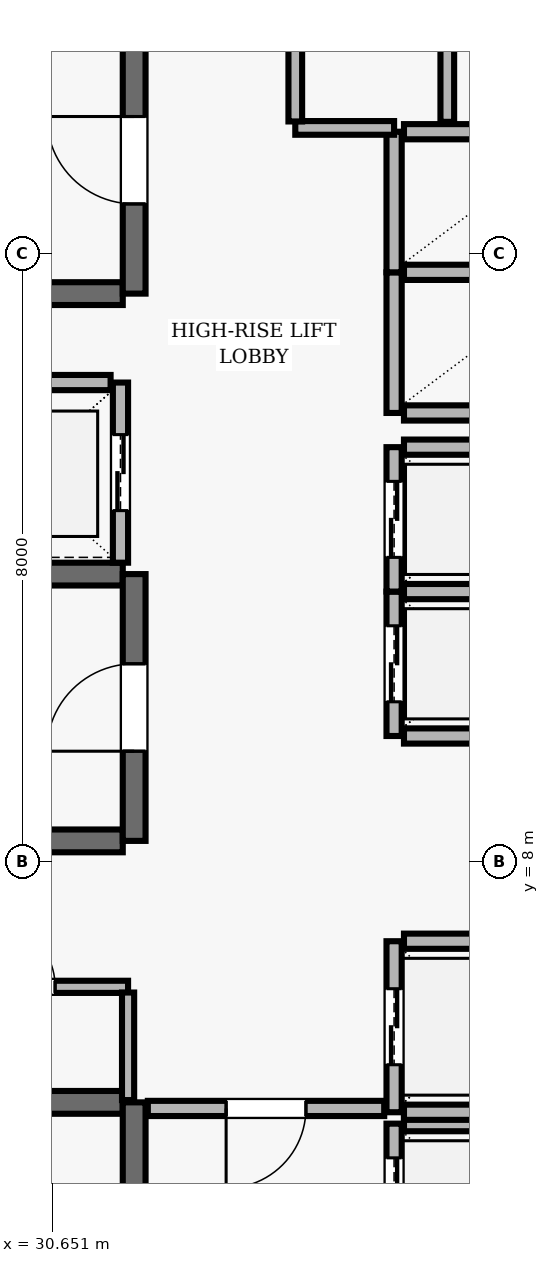
"""IFC4 building model, lengths in metres.
Left out: names, types, materials, properties, quantities, classifications, styles, units other than length and angle.
Written with IfcOpenShell. Run it as: python <this file> out.ifc"""

import sys

from ifc_helpers import new_model, si_unit, direction, frame, frame_2d, origin, place, context, subcontext, project, spatial, rectangle, extrude, element, fill, save


model = new_model("IFC4")
c1 = context("Model", 3, precision=1e-05, world=origin(), true_north=direction((0.0, 1.0)))
c2 = subcontext(c1, "Body", "Model", "MODEL_VIEW")
j1 = project(units=[si_unit("LENGTHUNIT", "METRE"), si_unit("PLANEANGLEUNIT", "RADIAN")], contexts=[c1])
p1 = place(None, origin())
s1 = spatial("IfcSite", under=j1, at=p1, CompositionType="ELEMENT")
p2 = place(p1, origin())
s2 = spatial("IfcBuilding", under=s1, at=p2, CompositionType="ELEMENT")
p3 = place(p2, frame((0.0, 0.0, 207.0)))
s3 = spatial("IfcBuildingStorey", under=s2, at=p3, CompositionType="ELEMENT", Elevation=207.0)
p4 = place(p3, frame((31.58, 4.83, 0.0), z_axis=(0.0, 0.0, 1.0), x_axis=(-1.0, 0.0, 0.0)))
e1 = element("IfcWall", 1, at=p4, inside=s3, PredefinedType="SHEAR", context=c2, shape_type="SweptSolid", body=[
    extrude(rectangle(XDim=8.36, YDim=0.3, at=frame_2d((4.18, 0.0))), origin(), (0.0, 0.0, 1.0), 3.69),
])
p5 = place(p3, frame((31.73, 0.96, 0.0), z_axis=(0.0, 0.0, 1.0), x_axis=(0.0, 1.0, 0.0)))
e2 = element("IfcWall", 2, at=p5, inside=s3, PredefinedType="SHEAR", context=c2, shape_type="SweptSolid", body=[
    extrude(rectangle(XDim=3.87, YDim=0.3, at=frame_2d((1.935, 0.0))), origin(), (0.0, 0.0, 1.0), 3.69),
])
p6 = place(p5, frame((1.54, 0.0, 0.0)))
e3 = element("IfcOpeningElement", 3, at=p6, cuts=e2, PredefinedType="OPENING", context=c2, shape_type="SweptSolid", body=[
    extrude(rectangle(XDim=1.15, YDim=2.15, at=frame_2d((0.575, 1.075))), frame((0.0, 0.16, 0.0), z_axis=(0.0, -1.0, 0.0), x_axis=(1.0, 0.0, 0.0)), (0.0, 0.0, 1.0), 0.32),
])
p7 = place(p3, frame((23.22, 15.47, 0.0), z_axis=(0.0, 0.0, 1.0), x_axis=(1.0, 0.0, 0.0)))
e4 = element("IfcWall", 4, at=p7, inside=s3, PredefinedType="SHEAR", context=c2, shape_type="SweptSolid", body=[
    extrude(rectangle(XDim=8.36, YDim=0.3, at=frame_2d((4.18, 0.0))), origin(), (0.0, 0.0, 1.0), 3.69),
])
p8 = place(p3, frame((31.73, 15.47, 0.0), z_axis=(0.0, 0.0, 1.0), x_axis=(0.0, 1.0, 0.0)))
e5 = element("IfcWall", 5, at=p8, inside=s3, PredefinedType="SHEAR", context=c2, shape_type="SweptSolid", body=[
    extrude(rectangle(XDim=3.51, YDim=0.3, at=frame_2d((1.755, 0.0))), origin(), (0.0, 0.0, 1.0), 3.69),
])
p9 = place(p8, frame((1.18, 0.0, 0.0)))
e6 = element("IfcOpeningElement", 6, at=p9, cuts=e5, PredefinedType="OPENING", context=c2, shape_type="SweptSolid", body=[
    extrude(rectangle(XDim=1.15, YDim=2.15, at=frame_2d((0.575, 1.075))), frame((0.0, 0.16, 0.0), z_axis=(0.0, -1.0, 0.0), x_axis=(1.0, 0.0, 0.0)), (0.0, 0.0, 1.0), 0.32),
])
for number, where, z_axis, x_axis in (
    (7, (31.58, 11.78, 0.0), (0.0, 0.0, 1.0), (-1.0, 0.0, 0.0)),
    (8, (23.22, 8.27, 0.0), (0.0, 0.0, 1.0), (1.0, 0.0, 0.0)),
):
    element("IfcWall", number, at=place(p3, frame(where, z_axis=z_axis, x_axis=x_axis)), inside=s3, PredefinedType="SHEAR", context=c2, shape_type="SweptSolid", body=[
        extrude(rectangle(XDim=8.36, YDim=0.3, at=frame_2d((4.18, 0.0))), origin(), (0.0, 0.0, 1.0), 3.69),
    ])
p10 = place(p3, frame((31.73, 8.27, 0.0), z_axis=(0.0, 0.0, 1.0), x_axis=(0.0, 1.0, 0.0)))
e9 = element("IfcWall", 9, at=p10, inside=s3, PredefinedType="SHEAR", context=c2, shape_type="SweptSolid", body=[
    extrude(rectangle(XDim=3.51, YDim=0.3, at=frame_2d((1.755, 0.0))), origin(), (0.0, 0.0, 1.0), 3.69),
])
p11 = place(p10, frame((1.18, 0.0, 0.0)))
e10 = element("IfcOpeningElement", 10, at=p11, cuts=e9, PredefinedType="OPENING", context=c2, shape_type="SweptSolid", body=[
    extrude(rectangle(XDim=1.15, YDim=2.15, at=frame_2d((0.575, 1.075))), frame((0.0, 0.16, 0.0), z_axis=(0.0, -1.0, 0.0), x_axis=(1.0, 0.0, 0.0)), (0.0, 0.0, 1.0), 0.32),
])
p12 = place(p3, frame((35.15, 4.55, 0.0), z_axis=(0.0, 0.0, 1.0), x_axis=(0.0, -1.0, 0.0)))
e11 = element("IfcWall", 11, at=p12, inside=s3, PredefinedType="SOLIDWALL", context=c2, shape_type="SweptSolid", body=[
    extrude(rectangle(XDim=2.1, YDim=0.2, at=frame_2d((1.05, 0.0))), origin(), (0.0, 0.0, 1.0), 3.69),
])
p13 = place(p12, frame((0.45, 0.0, 0.0)))
e12 = element("IfcOpeningElement", 12, at=p13, cuts=e11, PredefinedType="OPENING", context=c2, shape_type="SweptSolid", body=[
    extrude(rectangle(XDim=1.2, YDim=2.15, at=frame_2d((0.6, 1.075))), frame((0.0, 0.11, 0.0), z_axis=(0.0, -1.0, 0.0), x_axis=(1.0, 0.0, 0.0)), (0.0, 0.0, 1.0), 0.22),
])
p14 = place(p3, frame((37.42, 4.55, 0.0), z_axis=(0.0, 0.0, 1.0), x_axis=(-1.0, 0.0, 0.0)))
e13 = element("IfcWall", 13, at=p14, inside=s3, PredefinedType="SOLIDWALL", context=c2, shape_type="SweptSolid", body=[
    extrude(rectangle(XDim=2.14, YDim=0.2, at=frame_2d((1.07, 0.0))), origin(), (0.0, 0.0, 1.0), 3.69),
])
p15 = place(p3, frame((35.15, 6.95, 0.0), z_axis=(0.0, 0.0, 1.0), x_axis=(0.0, -1.0, 0.0)))
e14 = element("IfcWall", 14, at=p15, inside=s3, PredefinedType="SOLIDWALL", context=c2, shape_type="SweptSolid", body=[
    extrude(rectangle(XDim=2.25, YDim=0.2, at=frame_2d((1.125, 0.0))), origin(), (0.0, 0.0, 1.0), 3.69),
])
p16 = place(p15, frame((0.625, 0.0, 0.0)))
e15 = element("IfcOpeningElement", 15, at=p16, cuts=e14, PredefinedType="OPENING", context=c2, shape_type="SweptSolid", body=[
    extrude(rectangle(XDim=1.0, YDim=2.1, at=frame_2d((0.5, 1.05))), frame((0.0, 0.11, 0.0), z_axis=(0.0, -1.0, 0.0), x_axis=(1.0, 0.0, 0.0)), (0.0, 0.0, 1.0), 0.22),
])
for number, where, z_axis, x_axis in (
    (16, (35.28, 4.7, 0.0), (0.0, 0.0, 1.0), (1.0, 0.0, 0.0)),
    (17, (37.42, 6.95, 0.0), (0.0, 0.0, 1.0), (-1.0, 0.0, 0.0)),
):
    element("IfcWall", number, at=place(p3, frame(where, z_axis=z_axis, x_axis=x_axis)), inside=s3, PredefinedType="SOLIDWALL", context=c2, shape_type="SweptSolid", body=[
        extrude(rectangle(XDim=2.14, YDim=0.2, at=frame_2d((1.07, 0.0))), origin(), (0.0, 0.0, 1.0), 3.69),
    ])
p17 = place(p3, frame((35.15, 11.55, 0.0), z_axis=(0.0, 0.0, 1.0), x_axis=(0.0, -1.0, 0.0)))
e18 = element("IfcWall", 18, at=p17, inside=s3, PredefinedType="SOLIDWALL", context=c2, shape_type="SweptSolid", body=[
    extrude(rectangle(XDim=1.9, YDim=0.2, at=frame_2d((0.95, 0.0))), origin(), (0.0, 0.0, 1.0), 3.69),
])
p18 = place(p17, frame((0.45, 0.0, 0.0)))
e19 = element("IfcOpeningElement", 19, at=p18, cuts=e18, PredefinedType="OPENING", context=c2, shape_type="SweptSolid", body=[
    extrude(rectangle(XDim=1.0, YDim=2.1, at=frame_2d((0.5, 1.05))), frame((0.0, 0.11, 0.0), z_axis=(0.0, -1.0, 0.0), x_axis=(1.0, 0.0, 0.0)), (0.0, 0.0, 1.0), 0.22),
])
for number, where, z_axis, x_axis in (
    (20, (35.28, 9.65, 0.0), (0.0, 0.0, 1.0), (1.0, 0.0, 0.0)),
    (21, (37.42, 11.55, 0.0), (0.0, 0.0, 1.0), (-1.0, 0.0, 0.0)),
):
    element("IfcWall", number, at=place(p3, frame(where, z_axis=z_axis, x_axis=x_axis)), inside=s3, PredefinedType="SOLIDWALL", context=c2, shape_type="SweptSolid", body=[
        extrude(rectangle(XDim=2.14, YDim=0.2, at=frame_2d((1.07, 0.0))), origin(), (0.0, 0.0, 1.0), 3.69),
    ])
p19 = place(p3, frame((35.15, 13.45, 0.0), z_axis=(0.0, 0.0, 1.0), x_axis=(0.0, -1.0, 0.0)))
e22 = element("IfcWall", 22, at=p19, inside=s3, PredefinedType="SOLIDWALL", context=c2, shape_type="SweptSolid", body=[
    extrude(rectangle(XDim=1.9, YDim=0.2, at=frame_2d((0.95, 0.0))), origin(), (0.0, 0.0, 1.0), 3.69),
])
p20 = place(p19, frame((0.45, 0.0, 0.0)))
e23 = element("IfcOpeningElement", 23, at=p20, cuts=e22, PredefinedType="OPENING", context=c2, shape_type="SweptSolid", body=[
    extrude(rectangle(XDim=1.0, YDim=2.1, at=frame_2d((0.5, 1.05))), frame((0.0, 0.11, 0.0), z_axis=(0.0, -1.0, 0.0), x_axis=(1.0, 0.0, 0.0)), (0.0, 0.0, 1.0), 0.22),
])
p21 = place(p3, frame((37.42, 13.45, 0.0), z_axis=(0.0, 0.0, 1.0), x_axis=(-1.0, 0.0, 0.0)))
e24 = element("IfcWall", 24, at=p21, inside=s3, PredefinedType="SOLIDWALL", context=c2, shape_type="SweptSolid", body=[
    extrude(rectangle(XDim=2.14, YDim=0.2, at=frame_2d((1.07, 0.0))), origin(), (0.0, 0.0, 1.0), 3.69),
])
p22 = place(p3, frame((31.55, 11.93, 0.0), z_axis=(0.0, 0.0, 1.0), x_axis=(0.0, 1.0, 0.0)))
e25 = element("IfcWall", 25, at=p22, inside=s3, PredefinedType="SOLIDWALL", context=c2, shape_type="SweptSolid", body=[
    extrude(rectangle(XDim=2.37, YDim=0.2, at=frame_2d((1.185, 0.0))), origin(), (0.0, 0.0, 1.0), 3.69),
])
p23 = place(p22, frame((0.685, 0.0, 0.0)))
e26 = element("IfcOpeningElement", 26, at=p23, cuts=e25, PredefinedType="OPENING", context=c2, shape_type="SweptSolid", body=[
    extrude(rectangle(XDim=1.0, YDim=2.1, at=frame_2d((0.5, 1.05))), frame((0.0, 0.11, 0.0), z_axis=(0.0, -1.0, 0.0), x_axis=(1.0, 0.0, 0.0)), (0.0, 0.0, 1.0), 0.22),
])
p24 = place(p3, frame((31.42, 14.3, 0.0), z_axis=(0.0, 0.0, 1.0), x_axis=(-1.0, 0.0, 0.0)))
e27 = element("IfcWall", 27, at=p24, inside=s3, PredefinedType="SOLIDWALL", context=c2, shape_type="SweptSolid", body=[
    extrude(rectangle(XDim=2.44, YDim=0.2, at=frame_2d((1.22, 0.0))), origin(), (0.0, 0.0, 1.0), 3.69),
])
p25 = place(p3, frame((35.15, 15.75, 0.0), z_axis=(0.0, 0.0, 1.0), x_axis=(0.0, -1.0, 0.0)))
e28 = element("IfcWall", 28, at=p25, inside=s3, PredefinedType="SOLIDWALL", context=c2, shape_type="SweptSolid", body=[
    extrude(rectangle(XDim=1.85, YDim=0.2, at=frame_2d((0.925, 0.0))), origin(), (0.0, 0.0, 1.0), 3.69),
])
for number, where, z_axis, x_axis in (
    (29, (35.28, 13.9, 0.0), (0.0, 0.0, 1.0), (1.0, 0.0, 0.0)),
    (30, (37.42, 15.75, 0.0), (0.0, 0.0, 1.0), (-1.0, 0.0, 0.0)),
):
    element("IfcWall", number, at=place(p3, frame(where, z_axis=z_axis, x_axis=x_axis)), inside=s3, PredefinedType="SOLIDWALL", context=c2, shape_type="SweptSolid", body=[
        extrude(rectangle(XDim=2.14, YDim=0.2, at=frame_2d((1.07, 0.0))), origin(), (0.0, 0.0, 1.0), 3.69),
    ])
p26 = place(p3, frame((35.15, 17.6, 0.0), z_axis=(0.0, 0.0, 1.0), x_axis=(0.0, -1.0, 0.0)))
e31 = element("IfcWall", 31, at=p26, inside=s3, PredefinedType="SOLIDWALL", context=c2, shape_type="SweptSolid", body=[
    extrude(rectangle(XDim=1.85, YDim=0.2, at=frame_2d((0.925, 0.0))), origin(), (0.0, 0.0, 1.0), 3.69),
])
p27 = place(p3, frame((37.42, 17.6, 0.0), z_axis=(0.0, 0.0, 1.0), x_axis=(-1.0, 0.0, 0.0)))
e32 = element("IfcWall", 32, at=p27, inside=s3, PredefinedType="SOLIDWALL", context=c2, shape_type="SweptSolid", body=[
    extrude(rectangle(XDim=2.14, YDim=0.2, at=frame_2d((1.07, 0.0))), origin(), (0.0, 0.0, 1.0), 3.69),
])
p28 = place(p3, frame((28.85, 6.35, 0.0), z_axis=(0.0, 0.0, 1.0), x_axis=(1.0, 0.0, 0.0)))
e33 = element("IfcWall", 33, at=p28, inside=s3, PredefinedType="PARTITIONING", context=c2, shape_type="SweptSolid", body=[
    extrude(rectangle(XDim=2.8, YDim=0.16, at=frame_2d((1.4, 0.0))), origin(), (0.0, 0.0, 1.0), 3.69),
])
p29 = place(p28, frame((0.96, 0.0, 0.0)))
e34 = element("IfcOpeningElement", 34, at=p29, cuts=e33, PredefinedType="OPENING", context=c2, shape_type="SweptSolid", body=[
    extrude(rectangle(XDim=0.88, YDim=2.1, at=frame_2d((0.44, 1.05))), frame((0.0, 0.09, 0.0), z_axis=(0.0, -1.0, 0.0), x_axis=(1.0, 0.0, 0.0)), (0.0, 0.0, 1.0), 0.18),
])
p30 = place(p3, frame((33.85, 17.65, 0.0), z_axis=(0.0, 0.0, 1.0), x_axis=(1.0, 0.0, 0.0)))
e35 = element("IfcWall", 35, at=p30, inside=s3, PredefinedType="PARTITIONING", context=c2, shape_type="SweptSolid", body=[
    extrude(rectangle(XDim=1.3, YDim=0.18, at=frame_2d((0.65, 0.0))), origin(), (0.0, 0.0, 1.0), 3.69),
])
p31 = place(p3, frame((35.02, 4.75, 0.0), z_axis=(0.0, 0.0, 1.0), x_axis=(-1.0, 0.0, 0.0)))
e36 = element("IfcWall", 36, at=p31, inside=s3, PredefinedType="SOLIDWALL", context=c2, shape_type="SweptSolid", body=[
    extrude(rectangle(XDim=3.11, YDim=0.2, at=frame_2d((1.555, 0.0))), origin(), (0.0, 0.0, 1.0), 3.69),
])
p32 = place(p31, frame((1.03, 0.0, 0.0)))
e37 = element("IfcOpeningElement", 37, at=p32, cuts=e36, PredefinedType="OPENING", context=c2, shape_type="SweptSolid", body=[
    extrude(rectangle(XDim=1.05, YDim=2.15, at=frame_2d((0.525, 1.075))), frame((0.0, 0.11, 0.0), z_axis=(0.0, -1.0, 0.0), x_axis=(1.0, 0.0, 0.0)), (0.0, 0.0, 1.0), 0.22),
])
p33 = place(p3, frame((31.65, 4.86, 0.0), z_axis=(0.0, 0.0, 1.0), x_axis=(0.0, 1.0, 0.0)))
e38 = element("IfcWall", 38, at=p33, inside=s3, PredefinedType="PARTITIONING", context=c2, shape_type="SweptSolid", body=[
    extrude(rectangle(XDim=1.415, YDim=0.16, at=frame_2d((0.708, 0.0))), origin(), (0.0, 0.0, 1.0), 3.69),
])
p34 = place(p3, frame((33.85, 17.735, 0.0), z_axis=(0.0, 0.0, 1.0), x_axis=(0.0, 1.0, 0.0)))
e39 = element("IfcWall", 39, at=p34, inside=s3, PredefinedType="PARTITIONING", context=c2, shape_type="SweptSolid", body=[
    extrude(rectangle(XDim=6.03, YDim=0.18, at=frame_2d((3.015, 0.0))), origin(), (0.0, 0.0, 1.0), 3.69),
])
p35 = place(p34, frame((2.54, 0.0, 0.0)))
e40 = element("IfcOpeningElement", 40, at=p35, cuts=e39, PredefinedType="OPENING", context=c2, shape_type="SweptSolid", body=[
    extrude(rectangle(XDim=0.95, YDim=2.1, at=frame_2d((0.475, 1.05))), frame((0.0, 0.1, 0.0), z_axis=(0.0, -1.0, 0.0), x_axis=(1.0, 0.0, 0.0)), (0.0, 0.0, 1.0), 0.2),
])
p36 = place(p3, frame((35.85, 17.73, 0.0), z_axis=(0.0, 0.0, 1.0), x_axis=(0.0, 1.0, 0.0)))
e41 = element("IfcWall", 41, at=p36, inside=s3, PredefinedType="PARTITIONING", context=c2, shape_type="SweptSolid", body=[
    extrude(rectangle(XDim=3.412, YDim=0.18, at=frame_2d((1.706, 0.0))), origin(), (0.0, 0.0, 1.0), 3.69),
])
p37 = place(p36, frame((1.256, 0.0, 0.0)))
e42 = element("IfcOpeningElement", 42, at=p37, cuts=e41, PredefinedType="OPENING", context=c2, shape_type="SweptSolid", body=[
    extrude(rectangle(XDim=0.9, YDim=2.1, at=frame_2d((0.45, 1.05))), frame((0.0, 0.1, 0.0), z_axis=(0.0, -1.0, 0.0), x_axis=(1.0, 0.0, 0.0)), (0.0, 0.0, 1.0), 0.2),
])
p38 = place(p9, origin())
e43 = element("IfcDoor", 43, at=p38, inside=s3, OperationType="SINGLE_SWING_RIGHT", PredefinedType="DOOR", context=c2, shape_type="SweptSolid", body=[
    extrude(rectangle(XDim=1.15, YDim=2.15, at=frame_2d((0.575, 1.075))), frame((0.0, 0.025, 0.0), z_axis=(0.0, -1.0, 0.0), x_axis=(1.0, 0.0, 0.0)), (0.0, 0.0, 1.0), 0.05),
])
fill(e6, e43)
p39 = place(p11, origin())
e44 = element("IfcDoor", 44, at=p39, inside=s3, OperationType="SINGLE_SWING_LEFT", PredefinedType="DOOR", context=c2, shape_type="SweptSolid", body=[
    extrude(rectangle(XDim=1.15, YDim=2.15, at=frame_2d((0.575, 1.075))), frame((0.0, 0.025, 0.0), z_axis=(0.0, -1.0, 0.0), x_axis=(1.0, 0.0, 0.0)), (0.0, 0.0, 1.0), 0.05),
])
fill(e10, e44)
p40 = place(p13, origin())
e45 = element("IfcDoor", 45, at=p40, inside=s3, OperationType="DOUBLE_DOOR_SLIDING", PredefinedType="DOOR", context=c2, shape_type="SweptSolid", body=[
    extrude(rectangle(XDim=1.2, YDim=2.15, at=frame_2d((0.6, 1.075))), frame((0.0, 0.025, 0.0), z_axis=(0.0, -1.0, 0.0), x_axis=(1.0, 0.0, 0.0)), (0.0, 0.0, 1.0), 0.05),
])
fill(e12, e45)
p41 = place(p16, origin())
e46 = element("IfcDoor", 46, at=p41, inside=s3, OperationType="DOUBLE_DOOR_SLIDING", PredefinedType="DOOR", context=c2, shape_type="SweptSolid", body=[
    extrude(rectangle(XDim=1.0, YDim=2.1, at=frame_2d((0.5, 1.05))), frame((0.0, 0.025, 0.0), z_axis=(0.0, -1.0, 0.0), x_axis=(1.0, 0.0, 0.0)), (0.0, 0.0, 1.0), 0.05),
])
fill(e15, e46)
p42 = place(p18, origin())
e47 = element("IfcDoor", 47, at=p42, inside=s3, OperationType="DOUBLE_DOOR_SLIDING", PredefinedType="DOOR", context=c2, shape_type="SweptSolid", body=[
    extrude(rectangle(XDim=1.0, YDim=2.1, at=frame_2d((0.5, 1.05))), frame((0.0, 0.025, 0.0), z_axis=(0.0, -1.0, 0.0), x_axis=(1.0, 0.0, 0.0)), (0.0, 0.0, 1.0), 0.05),
])
fill(e19, e47)
p43 = place(p20, origin())
e48 = element("IfcDoor", 48, at=p43, inside=s3, OperationType="DOUBLE_DOOR_SLIDING", PredefinedType="DOOR", context=c2, shape_type="SweptSolid", body=[
    extrude(rectangle(XDim=1.0, YDim=2.1, at=frame_2d((0.5, 1.05))), frame((0.0, 0.025, 0.0), z_axis=(0.0, -1.0, 0.0), x_axis=(1.0, 0.0, 0.0)), (0.0, 0.0, 1.0), 0.05),
])
fill(e23, e48)
p44 = place(p23, origin())
e49 = element("IfcDoor", 49, at=p44, inside=s3, OperationType="DOUBLE_DOOR_SLIDING", PredefinedType="DOOR", context=c2, shape_type="SweptSolid", body=[
    extrude(rectangle(XDim=1.0, YDim=2.1, at=frame_2d((0.5, 1.05))), frame((0.0, 0.025, 0.0), z_axis=(0.0, -1.0, 0.0), x_axis=(1.0, 0.0, 0.0)), (0.0, 0.0, 1.0), 0.05),
])
fill(e26, e49)
p45 = place(p32, origin())
e50 = element("IfcDoor", 50, at=p45, inside=s3, OperationType="SINGLE_SWING_RIGHT", PredefinedType="DOOR", context=c2, shape_type="SweptSolid", body=[
    extrude(rectangle(XDim=1.05, YDim=2.15, at=frame_2d((0.525, 1.075))), frame((0.0, 0.025, 0.0), z_axis=(0.0, -1.0, 0.0), x_axis=(1.0, 0.0, 0.0)), (0.0, 0.0, 1.0), 0.05),
])
fill(e37, e50)
p46 = place(p29, origin())
e51 = element("IfcDoor", 51, at=p46, inside=s3, OperationType="SINGLE_SWING_LEFT", PredefinedType="DOOR", context=c2, shape_type="SweptSolid", body=[
    extrude(rectangle(XDim=0.88, YDim=2.1, at=frame_2d((0.44, 1.05))), frame((0.0, 0.025, 0.0), z_axis=(0.0, -1.0, 0.0), x_axis=(1.0, 0.0, 0.0)), (0.0, 0.0, 1.0), 0.05),
])
fill(e34, e51)
save(model, sys.argv[1])
